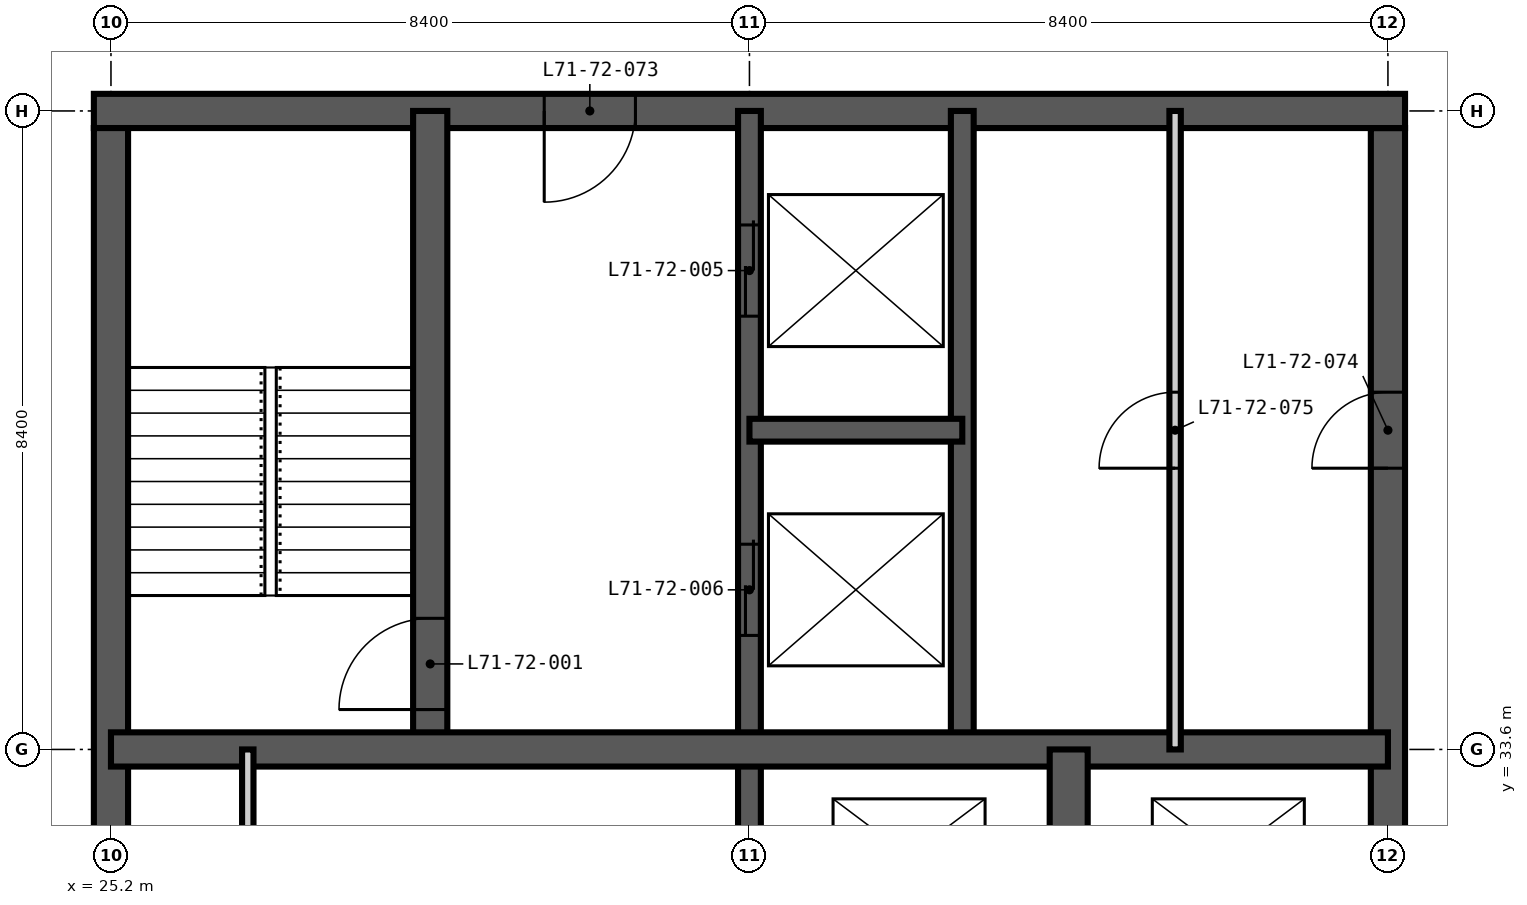
"""IFC4 building model, lengths in metres.
Left out: names, types, materials, properties, quantities, classifications, styles, units other than length and angle.
Written with IfcOpenShell. Run it as: python <this file> out.ifc"""

import sys

from ifc_helpers import new_model, si_unit, direction, frame, frame_2d, origin, place, context, subcontext, project, spatial, rectangle, extrude, element, fill, save


model = new_model("IFC4")
c1 = context("Model", 3, precision=1e-05, world=origin(), true_north=direction((0.0, 1.0)))
c2 = subcontext(c1, "Body", "Model", "MODEL_VIEW")
j1 = project(units=[si_unit("LENGTHUNIT", "METRE"), si_unit("PLANEANGLEUNIT", "RADIAN")], contexts=[c1])
p1 = place(None, origin())
s1 = spatial("IfcSite", under=j1, at=p1, CompositionType="ELEMENT")
p2 = place(p1, origin())
s2 = spatial("IfcBuilding", under=s1, at=p2, CompositionType="ELEMENT")
p3 = place(p2, frame((0.0, 0.0, 276.3)))
s3 = spatial("IfcBuildingStorey", under=s2, at=p3, CompositionType="ELEMENT", Elevation=276.3)
p4 = place(p3, frame((42.0, 17.025, -0.35), z_axis=(0.0, 0.0, 1.0), x_axis=(0.0, 1.0, 0.0)))
e1 = element("IfcWall", 1, at=p4, inside=s3, PredefinedType="SHEAR", context=c2, shape_type="SweptSolid", body=[
    extrude(rectangle(XDim=24.75, YDim=0.45, at=frame_2d((12.375, 0.0))), origin(), (0.0, 0.0, 1.0), 3.9),
])
p5 = place(p4, frame((0.575, 0.0, 0.35)))
e2 = element("IfcOpeningElement", 2, at=p5, cuts=e1, PredefinedType="OPENING", context=c2, shape_type="SweptSolid", body=[
    extrude(rectangle(XDim=1.2, YDim=2.2, at=frame_2d((0.6, 1.1))), frame((0.0, 0.235, 0.0), z_axis=(0.0, -1.0, 0.0), x_axis=(1.0, 0.0, 0.0)), (0.0, 0.0, 1.0), 0.47),
])
p6 = place(p4, frame((11.475, 0.0, 0.35)))
e3 = element("IfcOpeningElement", 3, at=p6, cuts=e1, PredefinedType="OPENING", context=c2, shape_type="SweptSolid", body=[
    extrude(rectangle(XDim=1.8, YDim=2.2, at=frame_2d((0.9, 1.1))), frame((0.0, 0.235, 0.0), z_axis=(0.0, -1.0, 0.0), x_axis=(1.0, 0.0, 0.0)), (0.0, 0.0, 1.0), 0.47),
])
p7 = place(p4, frame((20.275, 0.0, 0.35)))
e4 = element("IfcOpeningElement", 4, at=p7, cuts=e1, PredefinedType="OPENING", context=c2, shape_type="SweptSolid", body=[
    extrude(rectangle(XDim=1.0, YDim=2.1, at=frame_2d((0.5, 1.05))), frame((0.0, 0.235, 0.0), z_axis=(0.0, -1.0, 0.0), x_axis=(1.0, 0.0, 0.0)), (0.0, 0.0, 1.0), 0.47),
])
p8 = place(p3, frame((42.225, 42.0, -0.35), z_axis=(0.0, 0.0, 1.0), x_axis=(-1.0, 0.0, 0.0)))
e5 = element("IfcWall", 5, at=p8, inside=s3, PredefinedType="SHEAR", context=c2, shape_type="SweptSolid", body=[
    extrude(rectangle(XDim=17.25, YDim=0.45, at=frame_2d((8.625, 0.0))), origin(), (0.0, 0.0, 1.0), 3.9),
])
p9 = place(p8, frame((10.125, 0.0, 0.35)))
e6 = element("IfcOpeningElement", 6, at=p9, cuts=e5, PredefinedType="OPENING", context=c2, shape_type="SweptSolid", body=[
    extrude(rectangle(XDim=1.2, YDim=2.2, at=frame_2d((0.6, 1.1))), frame((0.0, 0.235, 0.0), z_axis=(0.0, -1.0, 0.0), x_axis=(1.0, 0.0, 0.0)), (0.0, 0.0, 1.0), 0.47),
])
p10 = place(p3, frame((25.2, 41.775, -0.35), z_axis=(0.0, 0.0, 1.0), x_axis=(0.0, -1.0, 0.0)))
e7 = element("IfcWall", 7, at=p10, inside=s3, PredefinedType="SHEAR", context=c2, shape_type="SweptSolid", body=[
    extrude(rectangle(XDim=24.75, YDim=0.45, at=frame_2d((12.375, 0.0))), origin(), (0.0, 0.0, 1.0), 3.9),
])
p11 = place(p10, frame((11.875, 0.0, 0.35)))
e8 = element("IfcOpeningElement", 8, at=p11, cuts=e7, PredefinedType="OPENING", context=c2, shape_type="SweptSolid", body=[
    extrude(rectangle(XDim=1.0, YDim=2.1, at=frame_2d((0.5, 1.05))), frame((0.0, 0.235, 0.0), z_axis=(0.0, -1.0, 0.0), x_axis=(1.0, 0.0, 0.0)), (0.0, 0.0, 1.0), 0.47),
])
p12 = place(p3, frame((33.6, 16.8, -0.35), z_axis=(0.0, 0.0, 1.0), x_axis=(0.0, 1.0, 0.0)))
e9 = element("IfcWall", 9, at=p12, inside=s3, PredefinedType="SHEAR", context=c2, shape_type="SweptSolid", body=[
    extrude(rectangle(XDim=25.2, YDim=0.3, at=frame_2d((12.6, 0.0))), origin(), (0.0, 0.0, 1.0), 3.9),
])
p13 = place(p12, frame((22.5, 0.0, 0.35)))
e10 = element("IfcOpeningElement", 10, at=p13, cuts=e9, PredefinedType="OPENING", context=c2, shape_type="SweptSolid", body=[
    extrude(rectangle(XDim=1.2, YDim=2.2, at=frame_2d((0.6, 1.1))), frame((0.0, 0.16, 0.0), z_axis=(0.0, -1.0, 0.0), x_axis=(1.0, 0.0, 0.0)), (0.0, 0.0, 1.0), 0.32),
])
p14 = place(p12, frame((18.3, 0.0, 0.35)))
e11 = element("IfcOpeningElement", 11, at=p14, cuts=e9, PredefinedType="OPENING", context=c2, shape_type="SweptSolid", body=[
    extrude(rectangle(XDim=1.2, YDim=2.2, at=frame_2d((0.6, 1.1))), frame((0.0, 0.16, 0.0), z_axis=(0.0, -1.0, 0.0), x_axis=(1.0, 0.0, 0.0)), (0.0, 0.0, 1.0), 0.32),
])
p15 = place(p12, frame((9.3, 0.0, 0.35)))
e12 = element("IfcOpeningElement", 12, at=p15, cuts=e9, PredefinedType="OPENING", context=c2, shape_type="SweptSolid", body=[
    extrude(rectangle(XDim=1.0, YDim=2.1, at=frame_2d((0.5, 1.05))), frame((0.0, 0.16, 0.0), z_axis=(0.0, -1.0, 0.0), x_axis=(1.0, 0.0, 0.0)), (0.0, 0.0, 1.0), 0.32),
])
p16 = place(p3, frame((36.4, 33.6, -0.35), z_axis=(0.0, 0.0, 1.0), x_axis=(0.0, 1.0, 0.0)))
e13 = element("IfcWall", 13, at=p16, inside=s3, PredefinedType="SHEAR", context=c2, shape_type="SweptSolid", body=[
    extrude(rectangle(XDim=8.4, YDim=0.3, at=frame_2d((4.2, 0.0))), origin(), (0.0, 0.0, 1.0), 3.9),
])
p17 = place(p3, frame((33.6, 37.8, -0.35), z_axis=(0.0, 0.0, 1.0), x_axis=(1.0, 0.0, 0.0)))
e14 = element("IfcWall", 14, at=p17, inside=s3, PredefinedType="SHEAR", context=c2, shape_type="SweptSolid", body=[
    extrude(rectangle(XDim=2.8, YDim=0.3, at=frame_2d((1.4, 0.0))), origin(), (0.0, 0.0, 1.0), 3.9),
])
p18 = place(p3, frame((29.4, 33.6, -0.35), z_axis=(0.0, 0.0, 1.0), x_axis=(0.0, 1.0, 0.0)))
e15 = element("IfcWall", 15, at=p18, inside=s3, PredefinedType="SHEAR", context=c2, shape_type="SweptSolid", body=[
    extrude(rectangle(XDim=8.4, YDim=0.45, at=frame_2d((4.2, 0.0))), origin(), (0.0, 0.0, 1.0), 3.9),
])
p19 = place(p18, frame((0.525, 0.0, 0.35)))
e16 = element("IfcOpeningElement", 16, at=p19, cuts=e15, PredefinedType="OPENING", context=c2, shape_type="SweptSolid", body=[
    extrude(rectangle(XDim=1.2, YDim=2.2, at=frame_2d((0.6, 1.1))), frame((0.0, 0.235, 0.0), z_axis=(0.0, -1.0, 0.0), x_axis=(1.0, 0.0, 0.0)), (0.0, 0.0, 1.0), 0.47),
])
p20 = place(p3, frame((25.2, 33.6, -0.35), z_axis=(0.0, 0.0, 1.0), x_axis=(1.0, 0.0, 0.0)))
e17 = element("IfcWall", 17, at=p20, inside=s3, PredefinedType="SHEAR", context=c2, shape_type="SweptSolid", body=[
    extrude(rectangle(XDim=16.8, YDim=0.45, at=frame_2d((8.4, 0.0))), origin(), (0.0, 0.0, 1.0), 3.9),
])
p21 = place(p3, frame((37.8, 30.8, -0.35), z_axis=(0.0, 0.0, 1.0), x_axis=(0.0, 1.0, 0.0)))
e18 = element("IfcWall", 18, at=p21, inside=s3, PredefinedType="SHEAR", context=c2, shape_type="SweptSolid", body=[
    extrude(rectangle(XDim=2.8, YDim=0.5, at=frame_2d((1.4, 0.0))), origin(), (0.0, 0.0, 1.0), 3.9),
])
p22 = place(p3, frame((27.0, 25.2, 0.0), z_axis=(0.0, 0.0, 1.0), x_axis=(0.0, 1.0, 0.0)))
e19 = element("IfcWall", 19, at=p22, inside=s3, PredefinedType="PARTITIONING", context=c2, shape_type="SweptSolid", body=[
    extrude(rectangle(XDim=8.4, YDim=0.15, at=frame_2d((4.2, 0.0))), origin(), (0.0, 0.0, 1.0), 3.55),
])
p23 = place(p22, frame((1.6, 0.0, 0.0)))
e20 = element("IfcOpeningElement", 20, at=p23, cuts=e19, PredefinedType="OPENING", context=c2, shape_type="SweptSolid", body=[
    extrude(rectangle(XDim=1.0, YDim=2.1, at=frame_2d((0.5, 1.05))), frame((0.0, 0.085, 0.0), z_axis=(0.0, -1.0, 0.0), x_axis=(1.0, 0.0, 0.0)), (0.0, 0.0, 1.0), 0.17),
])
p24 = place(p22, frame((5.8, 0.0, 0.0)))
e21 = element("IfcOpeningElement", 21, at=p24, cuts=e19, PredefinedType="OPENING", context=c2, shape_type="SweptSolid", body=[
    extrude(rectangle(XDim=1.0, YDim=2.1, at=frame_2d((0.5, 1.05))), frame((0.0, 0.085, 0.0), z_axis=(0.0, -1.0, 0.0), x_axis=(1.0, 0.0, 0.0)), (0.0, 0.0, 1.0), 0.17),
])
p25 = place(p3, frame((39.2, 33.6, 0.0), z_axis=(0.0, 0.0, 1.0), x_axis=(0.0, 1.0, 0.0)))
e22 = element("IfcWall", 22, at=p25, inside=s3, PredefinedType="PARTITIONING", context=c2, shape_type="SweptSolid", body=[
    extrude(rectangle(XDim=8.4, YDim=0.15, at=frame_2d((4.2, 0.0))), origin(), (0.0, 0.0, 1.0), 3.55),
])
p26 = place(p25, frame((3.7, 0.0, 0.0)))
e23 = element("IfcOpeningElement", 23, at=p26, cuts=e22, PredefinedType="OPENING", context=c2, shape_type="SweptSolid", body=[
    extrude(rectangle(XDim=1.0, YDim=2.1, at=frame_2d((0.5, 1.05))), frame((0.0, 0.085, 0.0), z_axis=(0.0, -1.0, 0.0), x_axis=(1.0, 0.0, 0.0)), (0.0, 0.0, 1.0), 0.17),
])
p27 = place(p19, origin())
e24 = element("IfcDoor", 24, at=p27, inside=s3, OperationType="SINGLE_SWING_LEFT", PredefinedType="DOOR", context=c2, shape_type="SweptSolid", body=[
    extrude(rectangle(XDim=1.2, YDim=2.2, at=frame_2d((0.6, 1.1))), frame((0.0, 0.025, 0.0), z_axis=(0.0, -1.0, 0.0), x_axis=(1.0, 0.0, 0.0)), (0.0, 0.0, 1.0), 0.05),
])
fill(e16, e24)
p28 = place(p13, origin())
e25 = element("IfcDoor", 25, at=p28, inside=s3, OperationType="DOUBLE_DOOR_SLIDING", PredefinedType="DOOR", context=c2, shape_type="SweptSolid", body=[
    extrude(rectangle(XDim=1.2, YDim=2.2, at=frame_2d((0.6, 1.1))), frame((0.0, 0.025, 0.0), z_axis=(0.0, -1.0, 0.0), x_axis=(1.0, 0.0, 0.0)), (0.0, 0.0, 1.0), 0.05),
])
fill(e10, e25)
p29 = place(p14, origin())
e26 = element("IfcDoor", 26, at=p29, inside=s3, OperationType="DOUBLE_DOOR_SLIDING", PredefinedType="DOOR", context=c2, shape_type="SweptSolid", body=[
    extrude(rectangle(XDim=1.2, YDim=2.2, at=frame_2d((0.6, 1.1))), frame((0.0, 0.025, 0.0), z_axis=(0.0, -1.0, 0.0), x_axis=(1.0, 0.0, 0.0)), (0.0, 0.0, 1.0), 0.05),
])
fill(e11, e26)
p30 = place(p9, origin())
e27 = element("IfcDoor", 27, at=p30, inside=s3, OperationType="SINGLE_SWING_RIGHT", PredefinedType="DOOR", context=c2, shape_type="SweptSolid", body=[
    extrude(rectangle(XDim=1.2, YDim=2.2, at=frame_2d((0.6, 1.1))), frame((0.0, 0.025, 0.0), z_axis=(0.0, -1.0, 0.0), x_axis=(1.0, 0.0, 0.0)), (0.0, 0.0, 1.0), 0.05),
])
fill(e6, e27)
p31 = place(p7, origin())
e28 = element("IfcDoor", 28, at=p31, inside=s3, OperationType="SINGLE_SWING_LEFT", PredefinedType="DOOR", context=c2, shape_type="SweptSolid", body=[
    extrude(rectangle(XDim=1.0, YDim=2.1, at=frame_2d((0.5, 1.05))), frame((0.0, 0.025, 0.0), z_axis=(0.0, -1.0, 0.0), x_axis=(1.0, 0.0, 0.0)), (0.0, 0.0, 1.0), 0.05),
])
fill(e4, e28)
p32 = place(p26, origin())
e29 = element("IfcDoor", 29, at=p32, inside=s3, OperationType="SINGLE_SWING_LEFT", PredefinedType="DOOR", context=c2, shape_type="SweptSolid", body=[
    extrude(rectangle(XDim=1.0, YDim=2.1, at=frame_2d((0.5, 1.05))), frame((0.0, 0.025, 0.0), z_axis=(0.0, -1.0, 0.0), x_axis=(1.0, 0.0, 0.0)), (0.0, 0.0, 1.0), 0.05),
])
fill(e23, e29)
save(model, sys.argv[1])
